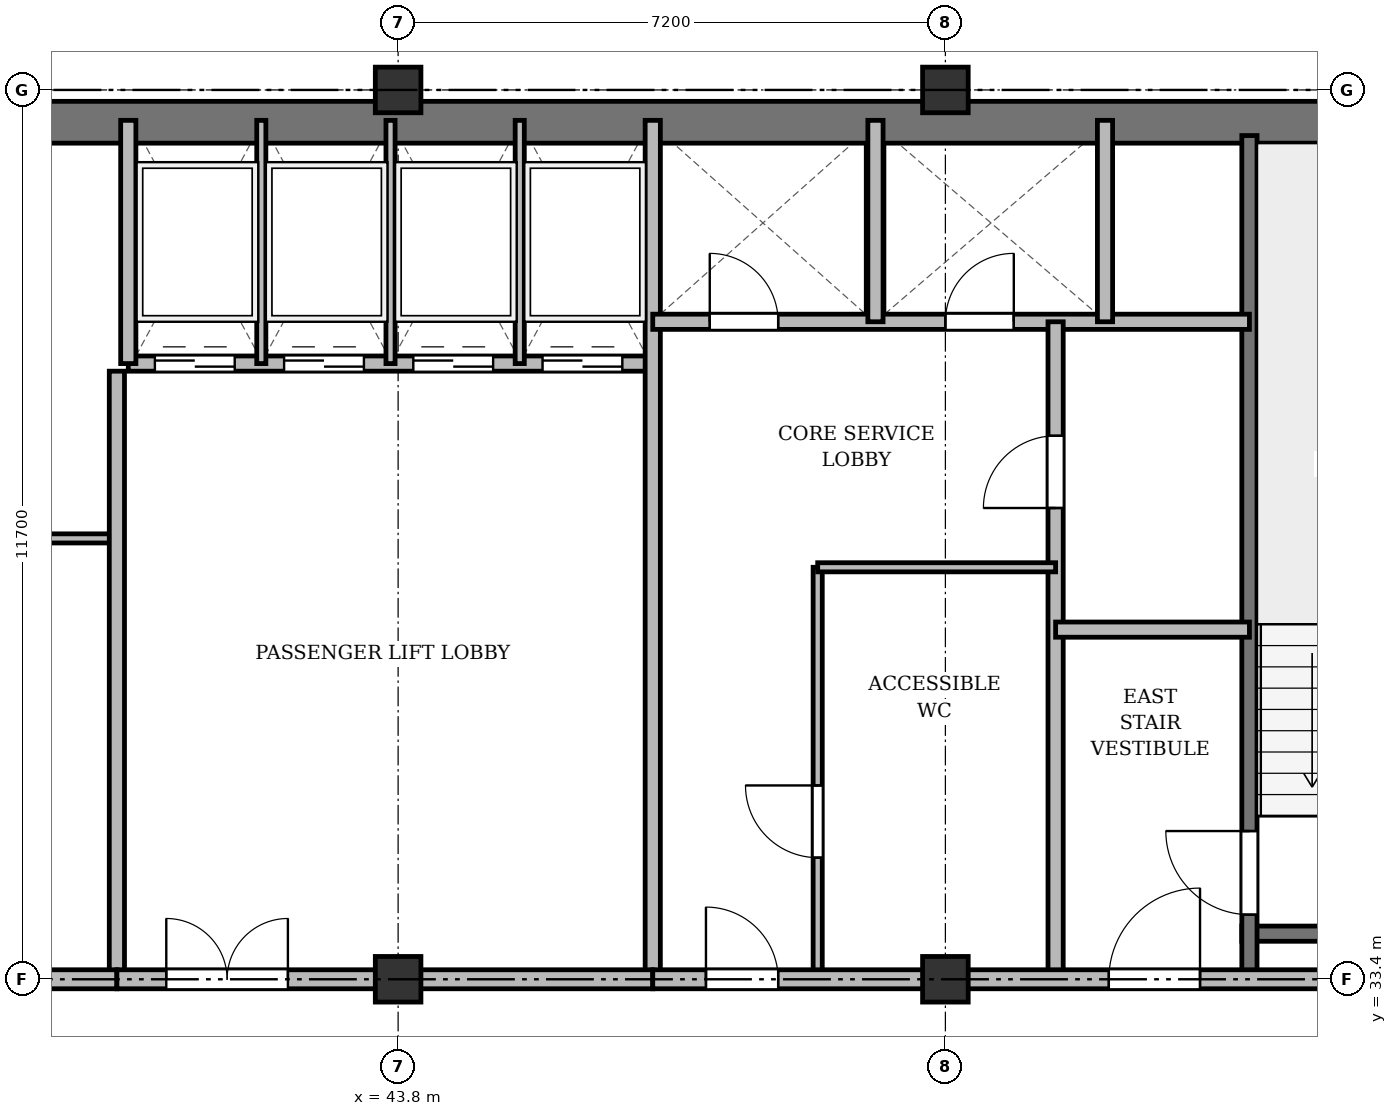
"""IFC4 building model, lengths in metres.
Left out: names, types, materials, properties, quantities, classifications, styles, units other than length and angle.
Written with IfcOpenShell. Run it as: python <this file> out.ifc"""

import sys

from ifc_helpers import new_model, si_unit, direction, frame, frame_2d, origin, origin_2d, place, context, subcontext, project, spatial, rectangle, extrude, source, transform, mapped, element, fill, save


model = new_model("IFC4")
c1 = context("Model", 3, precision=1e-05, world=origin(), true_north=direction((0.0, 1.0)))
c2 = subcontext(c1, "Body", "Model", "MODEL_VIEW")
j1 = project(units=[si_unit("LENGTHUNIT", "METRE"), si_unit("PLANEANGLEUNIT", "RADIAN")], contexts=[c1])
p1 = place(None, origin())
s1 = spatial("IfcSite", under=j1, at=p1, CompositionType="ELEMENT")
p2 = place(p1, origin())
s2 = spatial("IfcBuilding", under=s1, at=p2, CompositionType="ELEMENT")
p3 = place(p2, frame((0.0, 0.0, 281.1)))
s3 = spatial("IfcBuildingStorey", under=s2, at=p3, CompositionType="ELEMENT", Elevation=281.1)
m1 = source(origin(), c2, "Body", "SweptSolid", [
    extrude(rectangle(XDim=0.6, YDim=0.6, at=origin_2d()), origin(), (0.0, 0.0, 1.0), 3.6),
])
for number, where, z_axis, x_axis in (
    (1, (43.8, 33.4, 0.0), (0.0, 0.0, 1.0), (1.0, 0.0, 0.0)),
    (2, (43.8, 45.1, 0.0), (0.0, 0.0, 1.0), (1.0, 0.0, 0.0)),
    (3, (51.0, 33.4, 0.0), (0.0, 0.0, 1.0), (1.0, 0.0, 0.0)),
    (4, (51.0, 45.1, 0.0), (0.0, 0.0, 1.0), (1.0, 0.0, 0.0)),
):
    element("IfcColumn", number, at=place(p3, frame(where, z_axis=z_axis, x_axis=x_axis)), inside=s3, PredefinedType="COLUMN", context=c2, shape_type="MappedRepresentation", body=[
        mapped(m1, transform((0.0, 0.0, 0.0), x_axis=(1.0, 0.0, 0.0), y_axis=(0.0, 1.0, 0.0), z_axis=(0.0, 0.0, 1.0), scale=1.0)),
    ])
p4 = place(p3, frame((15.65, 44.675, 0.0), z_axis=(0.0, 0.0, 1.0), x_axis=(1.0, 0.0, 0.0)))
e5 = element("IfcWall", 5, at=p4, inside=s3, PredefinedType="SHEAR", context=c2, shape_type="SweptSolid", body=[
    extrude(rectangle(XDim=43.1, YDim=0.55, at=frame_2d((21.55, 0.0))), origin(), (0.0, 0.0, 1.0), 3.37),
])
p5 = place(p3, frame((54.9, 34.0, 0.0), z_axis=(0.0, 0.0, 1.0), x_axis=(1.0, 0.0, 0.0)))
e6 = element("IfcWall", 6, at=p5, inside=s3, PredefinedType="SHEAR", context=c2, shape_type="SweptSolid", body=[
    extrude(rectangle(XDim=3.4, YDim=0.2, at=frame_2d((1.7, 0.0))), origin(), (0.0, 0.0, 1.0), 3.37),
])
p6 = place(p3, frame((55.0, 33.4, 0.0), z_axis=(0.0, 0.0, 1.0), x_axis=(0.0, 1.0, 0.0)))
e7 = element("IfcWall", 7, at=p6, inside=s3, PredefinedType="SHEAR", context=c2, shape_type="SweptSolid", body=[
    extrude(rectangle(XDim=11.1, YDim=0.2, at=frame_2d((5.55, 0.0))), origin(), (0.0, 0.0, 1.0), 3.37),
])
p7 = place(p6, frame((0.85, 0.0, 0.0)))
e8 = element("IfcOpeningElement", 8, at=p7, cuts=e7, PredefinedType="OPENING", context=c2, shape_type="SweptSolid", body=[
    extrude(rectangle(XDim=1.1, YDim=2.15, at=frame_2d((0.55, 1.075))), frame((0.0, 0.11, 0.0), z_axis=(0.0, -1.0, 0.0), x_axis=(1.0, 0.0, 0.0)), (0.0, 0.0, 1.0), 0.22),
])
p8 = place(p3, frame((33.3, 39.2, 0.0), z_axis=(0.0, 0.0, 1.0), x_axis=(1.0, 0.0, 0.0)))
e9 = element("IfcWall", 9, at=p8, inside=s3, PredefinedType="PARTITIONING", context=c2, shape_type="SweptSolid", body=[
    extrude(rectangle(XDim=6.8, YDim=0.12, at=frame_2d((3.4, 0.0))), origin(), (0.0, 0.0, 1.0), 3.37),
])
p9 = place(p8, frame((2.6, 0.0, 0.0)))
e10 = element("IfcOpeningElement", 10, at=p9, cuts=e9, PredefinedType="OPENING", context=c2, shape_type="SweptSolid", body=[
    extrude(rectangle(XDim=0.95, YDim=2.15, at=frame_2d((0.475, 1.075))), frame((0.0, 0.07, 0.0), z_axis=(0.0, -1.0, 0.0), x_axis=(1.0, 0.0, 0.0)), (0.0, 0.0, 1.0), 0.14),
])
p10 = place(p3, frame((40.1, 33.4, 0.0), z_axis=(0.0, 0.0, 1.0), x_axis=(0.0, 1.0, 0.0)))
e11 = element("IfcWall", 11, at=p10, inside=s3, PredefinedType="SOLIDWALL", context=c2, shape_type="SweptSolid", body=[
    extrude(rectangle(XDim=8.0, YDim=0.2, at=frame_2d((4.0, 0.0))), origin(), (0.0, 0.0, 1.0), 2.92),
])
p11 = place(p3, frame((40.25, 41.5, 0.0), z_axis=(0.0, 0.0, 1.0), x_axis=(1.0, 0.0, 0.0)))
e12 = element("IfcWall", 12, at=p11, inside=s3, PredefinedType="SOLIDWALL", context=c2, shape_type="SweptSolid", body=[
    extrude(rectangle(XDim=6.9, YDim=0.2, at=frame_2d((3.45, 0.0))), origin(), (0.0, 0.0, 1.0), 3.37),
])
p12 = place(p11, frame((0.35, 0.0, 0.0)))
e13 = element("IfcOpeningElement", 13, at=p12, cuts=e12, PredefinedType="OPENING", context=c2, shape_type="SweptSolid", body=[
    extrude(rectangle(XDim=1.05, YDim=2.15, at=frame_2d((0.525, 1.075))), frame((0.0, 0.11, 0.0), z_axis=(0.0, -1.0, 0.0), x_axis=(1.0, 0.0, 0.0)), (0.0, 0.0, 1.0), 0.22),
])
p13 = place(p11, frame((2.05, 0.0, 0.0)))
e14 = element("IfcOpeningElement", 14, at=p13, cuts=e12, PredefinedType="OPENING", context=c2, shape_type="SweptSolid", body=[
    extrude(rectangle(XDim=1.05, YDim=2.15, at=frame_2d((0.525, 1.075))), frame((0.0, 0.11, 0.0), z_axis=(0.0, -1.0, 0.0), x_axis=(1.0, 0.0, 0.0)), (0.0, 0.0, 1.0), 0.22),
])
p14 = place(p11, frame((3.75, 0.0, 0.0)))
e15 = element("IfcOpeningElement", 15, at=p14, cuts=e12, PredefinedType="OPENING", context=c2, shape_type="SweptSolid", body=[
    extrude(rectangle(XDim=1.05, YDim=2.15, at=frame_2d((0.525, 1.075))), frame((0.0, 0.11, 0.0), z_axis=(0.0, -1.0, 0.0), x_axis=(1.0, 0.0, 0.0)), (0.0, 0.0, 1.0), 0.22),
])
p15 = place(p11, frame((5.45, 0.0, 0.0)))
e16 = element("IfcOpeningElement", 16, at=p15, cuts=e12, PredefinedType="OPENING", context=c2, shape_type="SweptSolid", body=[
    extrude(rectangle(XDim=1.05, YDim=2.15, at=frame_2d((0.525, 1.075))), frame((0.0, 0.11, 0.0), z_axis=(0.0, -1.0, 0.0), x_axis=(1.0, 0.0, 0.0)), (0.0, 0.0, 1.0), 0.22),
])
p16 = place(p3, frame((40.25, 41.5, 0.0), z_axis=(0.0, 0.0, 1.0), x_axis=(0.0, 1.0, 0.0)))
e17 = element("IfcWall", 17, at=p16, inside=s3, PredefinedType="SOLIDWALL", context=c2, shape_type="SweptSolid", body=[
    extrude(rectangle(XDim=3.2, YDim=0.2, at=frame_2d((1.6, 0.0))), origin(), (0.0, 0.0, 1.0), 3.37),
])
for number, where, z_axis, x_axis in (
    (18, (42.0, 41.5, 0.0), (0.0, 0.0, 1.0), (0.0, 1.0, 0.0)),
    (19, (43.7, 41.5, 0.0), (0.0, 0.0, 1.0), (0.0, 1.0, 0.0)),
    (20, (45.4, 41.5, 0.0), (0.0, 0.0, 1.0), (0.0, 1.0, 0.0)),
):
    element("IfcWall", number, at=place(p3, frame(where, z_axis=z_axis, x_axis=x_axis)), inside=s3, PredefinedType="PARTITIONING", context=c2, shape_type="SweptSolid", body=[
        extrude(rectangle(XDim=3.2, YDim=0.12, at=frame_2d((1.6, 0.0))), origin(), (0.0, 0.0, 1.0), 3.37),
    ])
p17 = place(p3, frame((47.15, 33.4, 0.0), z_axis=(0.0, 0.0, 1.0), x_axis=(0.0, 1.0, 0.0)))
e21 = element("IfcWall", 21, at=p17, inside=s3, PredefinedType="SOLIDWALL", context=c2, shape_type="SweptSolid", body=[
    extrude(rectangle(XDim=11.3, YDim=0.2, at=frame_2d((5.65, 0.0))), origin(), (0.0, 0.0, 1.0), 2.92),
])
p18 = place(p3, frame((33.3, 33.4, 0.0), z_axis=(0.0, 0.0, 1.0), x_axis=(1.0, 0.0, 0.0)))
e22 = element("IfcWall", 22, at=p18, inside=s3, PredefinedType="PARTITIONING", context=c2, shape_type="SweptSolid", body=[
    extrude(rectangle(XDim=6.8, YDim=0.25, at=frame_2d((3.4, 0.0))), origin(), (0.0, 0.0, 1.0), 2.92),
])
p19 = place(p18, frame((2.4, 0.0, 0.0)))
e23 = element("IfcOpeningElement", 23, at=p19, cuts=e22, PredefinedType="OPENING", context=c2, shape_type="SweptSolid", body=[
    extrude(rectangle(XDim=1.0, YDim=2.15, at=frame_2d((0.5, 1.075))), frame((0.0, 0.135, 0.0), z_axis=(0.0, -1.0, 0.0), x_axis=(1.0, 0.0, 0.0)), (0.0, 0.0, 1.0), 0.27),
])
p20 = place(p3, frame((40.1, 33.4, 0.0), z_axis=(0.0, 0.0, 1.0), x_axis=(1.0, 0.0, 0.0)))
e24 = element("IfcWall", 24, at=p20, inside=s3, PredefinedType="PARTITIONING", context=c2, shape_type="SweptSolid", body=[
    extrude(rectangle(XDim=7.05, YDim=0.25, at=frame_2d((3.525, 0.0))), origin(), (0.0, 0.0, 1.0), 2.92),
])
p21 = place(p20, frame((0.65, 0.0, 0.0)))
e25 = element("IfcOpeningElement", 25, at=p21, cuts=e24, PredefinedType="OPENING", context=c2, shape_type="SweptSolid", body=[
    extrude(rectangle(XDim=1.6, YDim=2.2, at=frame_2d((0.8, 1.1))), frame((0.0, 0.135, 0.0), z_axis=(0.0, -1.0, 0.0), x_axis=(1.0, 0.0, 0.0)), (0.0, 0.0, 1.0), 0.27),
])
p22 = place(p3, frame((47.15, 42.05, 0.0), z_axis=(0.0, 0.0, 1.0), x_axis=(1.0, 0.0, 0.0)))
e26 = element("IfcWall", 26, at=p22, inside=s3, PredefinedType="SOLIDWALL", context=c2, shape_type="SweptSolid", body=[
    extrude(rectangle(XDim=7.85, YDim=0.2, at=frame_2d((3.925, 0.0))), origin(), (0.0, 0.0, 1.0), 2.87),
])
p23 = place(p22, frame((0.75, 0.0, 0.0)))
e27 = element("IfcOpeningElement", 27, at=p23, cuts=e26, PredefinedType="OPENING", context=c2, shape_type="SweptSolid", body=[
    extrude(rectangle(XDim=0.9, YDim=2.1, at=frame_2d((0.45, 1.05))), frame((0.0, 0.11, 0.0), z_axis=(0.0, -1.0, 0.0), x_axis=(1.0, 0.0, 0.0)), (0.0, 0.0, 1.0), 0.22),
])
p24 = place(p22, frame((3.85, 0.0, 0.0)))
e28 = element("IfcOpeningElement", 28, at=p24, cuts=e26, PredefinedType="OPENING", context=c2, shape_type="SweptSolid", body=[
    extrude(rectangle(XDim=0.9, YDim=2.1, at=frame_2d((0.45, 1.05))), frame((0.0, 0.11, 0.0), z_axis=(0.0, -1.0, 0.0), x_axis=(1.0, 0.0, 0.0)), (0.0, 0.0, 1.0), 0.22),
])
for number, where, z_axis, x_axis in (
    (29, (50.08, 42.05, 0.0), (0.0, 0.0, 1.0), (0.0, 1.0, 0.0)),
    (30, (53.1, 42.05, 0.0), (0.0, 0.0, 1.0), (0.0, 1.0, 0.0)),
):
    element("IfcWall", number, at=place(p3, frame(where, z_axis=z_axis, x_axis=x_axis)), inside=s3, PredefinedType="SOLIDWALL", context=c2, shape_type="SweptSolid", body=[
        extrude(rectangle(XDim=2.65, YDim=0.2, at=frame_2d((1.325, 0.0))), origin(), (0.0, 0.0, 1.0), 3.37),
    ])
p25 = place(p3, frame((52.45, 33.4, 0.0), z_axis=(0.0, 0.0, 1.0), x_axis=(0.0, 1.0, 0.0)))
e31 = element("IfcWall", 31, at=p25, inside=s3, PredefinedType="PARTITIONING", context=c2, shape_type="SweptSolid", body=[
    extrude(rectangle(XDim=8.65, YDim=0.2, at=frame_2d((4.325, 0.0))), origin(), (0.0, 0.0, 1.0), 2.92),
])
p26 = place(p25, frame((6.2, 0.0, 0.0)))
e32 = element("IfcOpeningElement", 32, at=p26, cuts=e31, PredefinedType="OPENING", context=c2, shape_type="SweptSolid", body=[
    extrude(rectangle(XDim=0.95, YDim=2.15, at=frame_2d((0.475, 1.075))), frame((0.0, 0.11, 0.0), z_axis=(0.0, -1.0, 0.0), x_axis=(1.0, 0.0, 0.0)), (0.0, 0.0, 1.0), 0.22),
])
p27 = place(p3, frame((52.45, 38.0, 0.0), z_axis=(0.0, 0.0, 1.0), x_axis=(1.0, 0.0, 0.0)))
e33 = element("IfcWall", 33, at=p27, inside=s3, PredefinedType="PARTITIONING", context=c2, shape_type="SweptSolid", body=[
    extrude(rectangle(XDim=2.55, YDim=0.2, at=frame_2d((1.275, 0.0))), origin(), (0.0, 0.0, 1.0), 3.37),
])
p28 = place(p3, frame((49.32, 33.4, 0.0), z_axis=(0.0, 0.0, 1.0), x_axis=(0.0, 1.0, 0.0)))
e34 = element("IfcWall", 34, at=p28, inside=s3, PredefinedType="PARTITIONING", context=c2, shape_type="SweptSolid", body=[
    extrude(rectangle(XDim=5.42, YDim=0.12, at=frame_2d((2.71, 0.0))), origin(), (0.0, 0.0, 1.0), 2.92),
])
p29 = place(p28, frame((1.6, 0.0, 0.0)))
e35 = element("IfcOpeningElement", 35, at=p29, cuts=e34, PredefinedType="OPENING", context=c2, shape_type="SweptSolid", body=[
    extrude(rectangle(XDim=0.95, YDim=2.15, at=frame_2d((0.475, 1.075))), frame((0.0, 0.07, 0.0), z_axis=(0.0, -1.0, 0.0), x_axis=(1.0, 0.0, 0.0)), (0.0, 0.0, 1.0), 0.14),
])
p30 = place(p3, frame((49.32, 38.82, 0.0), z_axis=(0.0, 0.0, 1.0), x_axis=(1.0, 0.0, 0.0)))
e36 = element("IfcWall", 36, at=p30, inside=s3, PredefinedType="PARTITIONING", context=c2, shape_type="SweptSolid", body=[
    extrude(rectangle(XDim=3.13, YDim=0.12, at=frame_2d((1.565, 0.0))), origin(), (0.0, 0.0, 1.0), 2.87),
])
p31 = place(p3, frame((47.15, 33.4, 0.0), z_axis=(0.0, 0.0, 1.0), x_axis=(1.0, 0.0, 0.0)))
e37 = element("IfcWall", 37, at=p31, inside=s3, PredefinedType="PARTITIONING", context=c2, shape_type="SweptSolid", body=[
    extrude(rectangle(XDim=11.15, YDim=0.25, at=frame_2d((5.575, 0.0))), origin(), (0.0, 0.0, 1.0), 2.92),
])
p32 = place(p31, frame((0.7, 0.0, 0.0)))
e38 = element("IfcOpeningElement", 38, at=p32, cuts=e37, PredefinedType="OPENING", context=c2, shape_type="SweptSolid", body=[
    extrude(rectangle(XDim=0.95, YDim=2.15, at=frame_2d((0.475, 1.075))), frame((0.0, 0.135, 0.0), z_axis=(0.0, -1.0, 0.0), x_axis=(1.0, 0.0, 0.0)), (0.0, 0.0, 1.0), 0.27),
])
p33 = place(p31, frame((6.0, 0.0, 0.0)))
e39 = element("IfcOpeningElement", 39, at=p33, cuts=e37, PredefinedType="OPENING", context=c2, shape_type="SweptSolid", body=[
    extrude(rectangle(XDim=1.2, YDim=2.15, at=frame_2d((0.6, 1.075))), frame((0.0, 0.135, 0.0), z_axis=(0.0, -1.0, 0.0), x_axis=(1.0, 0.0, 0.0)), (0.0, 0.0, 1.0), 0.27),
])
m2 = source(origin(), c2, "Body", "SweptSolid", [
    extrude(rectangle(XDim=1.1, YDim=2.15, at=frame_2d((0.55, 1.075))), frame((0.0, 0.025, 0.0), z_axis=(0.0, -1.0, 0.0), x_axis=(1.0, 0.0, 0.0)), (0.0, 0.0, 1.0), 0.05),
])
p34 = place(p7, origin())
e40 = element("IfcDoor", 40, at=p34, inside=s3, OperationType="SINGLE_SWING_RIGHT", PredefinedType="DOOR", context=c2, shape_type="MappedRepresentation", body=[
    mapped(m2, transform((0.0, 0.0, 0.0), x_axis=(1.0, 0.0, 0.0), y_axis=(0.0, 1.0, 0.0), z_axis=(0.0, 0.0, 1.0), scale=1.0)),
])
fill(e8, e40)
m3 = source(origin(), c2, "Body", "SweptSolid", [
    extrude(rectangle(XDim=1.05, YDim=2.15, at=frame_2d((0.525, 1.075))), frame((0.0, 0.025, 0.0), z_axis=(0.0, -1.0, 0.0), x_axis=(1.0, 0.0, 0.0)), (0.0, 0.0, 1.0), 0.05),
])
p35 = place(p12, origin())
e41 = element("IfcDoor", 41, at=p35, inside=s3, OperationType="DOUBLE_DOOR_SLIDING", PredefinedType="DOOR", context=c2, shape_type="MappedRepresentation", body=[
    mapped(m3, transform((0.0, 0.0, 0.0), x_axis=(1.0, 0.0, 0.0), y_axis=(0.0, 1.0, 0.0), z_axis=(0.0, 0.0, 1.0), scale=1.0)),
])
fill(e13, e41)
p36 = place(p13, origin())
e42 = element("IfcDoor", 42, at=p36, inside=s3, OperationType="DOUBLE_DOOR_SLIDING", PredefinedType="DOOR", context=c2, shape_type="MappedRepresentation", body=[
    mapped(m3, transform((0.0, 0.0, 0.0), x_axis=(1.0, 0.0, 0.0), y_axis=(0.0, 1.0, 0.0), z_axis=(0.0, 0.0, 1.0), scale=1.0)),
])
fill(e14, e42)
p37 = place(p14, origin())
e43 = element("IfcDoor", 43, at=p37, inside=s3, OperationType="DOUBLE_DOOR_SLIDING", PredefinedType="DOOR", context=c2, shape_type="MappedRepresentation", body=[
    mapped(m3, transform((0.0, 0.0, 0.0), x_axis=(1.0, 0.0, 0.0), y_axis=(0.0, 1.0, 0.0), z_axis=(0.0, 0.0, 1.0), scale=1.0)),
])
fill(e15, e43)
p38 = place(p15, origin())
e44 = element("IfcDoor", 44, at=p38, inside=s3, OperationType="DOUBLE_DOOR_SLIDING", PredefinedType="DOOR", context=c2, shape_type="MappedRepresentation", body=[
    mapped(m3, transform((0.0, 0.0, 0.0), x_axis=(1.0, 0.0, 0.0), y_axis=(0.0, 1.0, 0.0), z_axis=(0.0, 0.0, 1.0), scale=1.0)),
])
fill(e16, e44)
m4 = source(origin(), c2, "Body", "SweptSolid", [
    extrude(rectangle(XDim=1.6, YDim=2.2, at=frame_2d((0.8, 1.1))), frame((0.0, 0.025, 0.0), z_axis=(0.0, -1.0, 0.0), x_axis=(1.0, 0.0, 0.0)), (0.0, 0.0, 1.0), 0.05),
])
p39 = place(p21, origin())
e45 = element("IfcDoor", 45, at=p39, inside=s3, OperationType="DOUBLE_DOOR_SINGLE_SWING", PredefinedType="DOOR", context=c2, shape_type="MappedRepresentation", body=[
    mapped(m4, transform((0.0, 0.0, 0.0), x_axis=(1.0, 0.0, 0.0), y_axis=(0.0, 1.0, 0.0), z_axis=(0.0, 0.0, 1.0), scale=1.0)),
])
fill(e25, e45)
m5 = source(origin(), c2, "Body", "SweptSolid", [
    extrude(rectangle(XDim=0.9, YDim=2.1, at=frame_2d((0.45, 1.05))), frame((0.0, 0.025, 0.0), z_axis=(0.0, -1.0, 0.0), x_axis=(1.0, 0.0, 0.0)), (0.0, 0.0, 1.0), 0.05),
])
p40 = place(p23, origin())
e46 = element("IfcDoor", 46, at=p40, inside=s3, OperationType="SINGLE_SWING_LEFT", PredefinedType="DOOR", context=c2, shape_type="MappedRepresentation", body=[
    mapped(m5, transform((0.0, 0.0, 0.0), x_axis=(1.0, 0.0, 0.0), y_axis=(0.0, 1.0, 0.0), z_axis=(0.0, 0.0, 1.0), scale=1.0)),
])
fill(e27, e46)
p41 = place(p24, origin())
e47 = element("IfcDoor", 47, at=p41, inside=s3, OperationType="SINGLE_SWING_RIGHT", PredefinedType="DOOR", context=c2, shape_type="MappedRepresentation", body=[
    mapped(m5, transform((0.0, 0.0, 0.0), x_axis=(1.0, 0.0, 0.0), y_axis=(0.0, 1.0, 0.0), z_axis=(0.0, 0.0, 1.0), scale=1.0)),
])
fill(e28, e47)
m6 = source(origin(), c2, "Body", "SweptSolid", [
    extrude(rectangle(XDim=0.95, YDim=2.15, at=frame_2d((0.475, 1.075))), frame((0.0, 0.025, 0.0), z_axis=(0.0, -1.0, 0.0), x_axis=(1.0, 0.0, 0.0)), (0.0, 0.0, 1.0), 0.05),
])
p42 = place(p26, origin())
e48 = element("IfcDoor", 48, at=p42, inside=s3, OperationType="SINGLE_SWING_LEFT", PredefinedType="DOOR", context=c2, shape_type="MappedRepresentation", body=[
    mapped(m6, transform((0.0, 0.0, 0.0), x_axis=(1.0, 0.0, 0.0), y_axis=(0.0, 1.0, 0.0), z_axis=(0.0, 0.0, 1.0), scale=1.0)),
])
fill(e32, e48)
p43 = place(p29, origin())
e49 = element("IfcDoor", 49, at=p43, inside=s3, OperationType="SINGLE_SWING_RIGHT", PredefinedType="DOOR", context=c2, shape_type="MappedRepresentation", body=[
    mapped(m6, transform((0.0, 0.0, 0.0), x_axis=(1.0, 0.0, 0.0), y_axis=(0.0, 1.0, 0.0), z_axis=(0.0, 0.0, 1.0), scale=1.0)),
])
fill(e35, e49)
p44 = place(p32, origin())
e50 = element("IfcDoor", 50, at=p44, inside=s3, OperationType="SINGLE_SWING_LEFT", PredefinedType="DOOR", context=c2, shape_type="MappedRepresentation", body=[
    mapped(m6, transform((0.0, 0.0, 0.0), x_axis=(1.0, 0.0, 0.0), y_axis=(0.0, 1.0, 0.0), z_axis=(0.0, 0.0, 1.0), scale=1.0)),
])
fill(e38, e50)
m7 = source(origin(), c2, "Body", "SweptSolid", [
    extrude(rectangle(XDim=1.2, YDim=2.15, at=frame_2d((0.6, 1.075))), frame((0.0, 0.025, 0.0), z_axis=(0.0, -1.0, 0.0), x_axis=(1.0, 0.0, 0.0)), (0.0, 0.0, 1.0), 0.05),
])
p45 = place(p33, origin())
e51 = element("IfcDoor", 51, at=p45, inside=s3, OperationType="SINGLE_SWING_RIGHT", PredefinedType="DOOR", context=c2, shape_type="MappedRepresentation", body=[
    mapped(m7, transform((0.0, 0.0, 0.0), x_axis=(1.0, 0.0, 0.0), y_axis=(0.0, 1.0, 0.0), z_axis=(0.0, 0.0, 1.0), scale=1.0)),
])
fill(e39, e51)
save(model, sys.argv[1])
